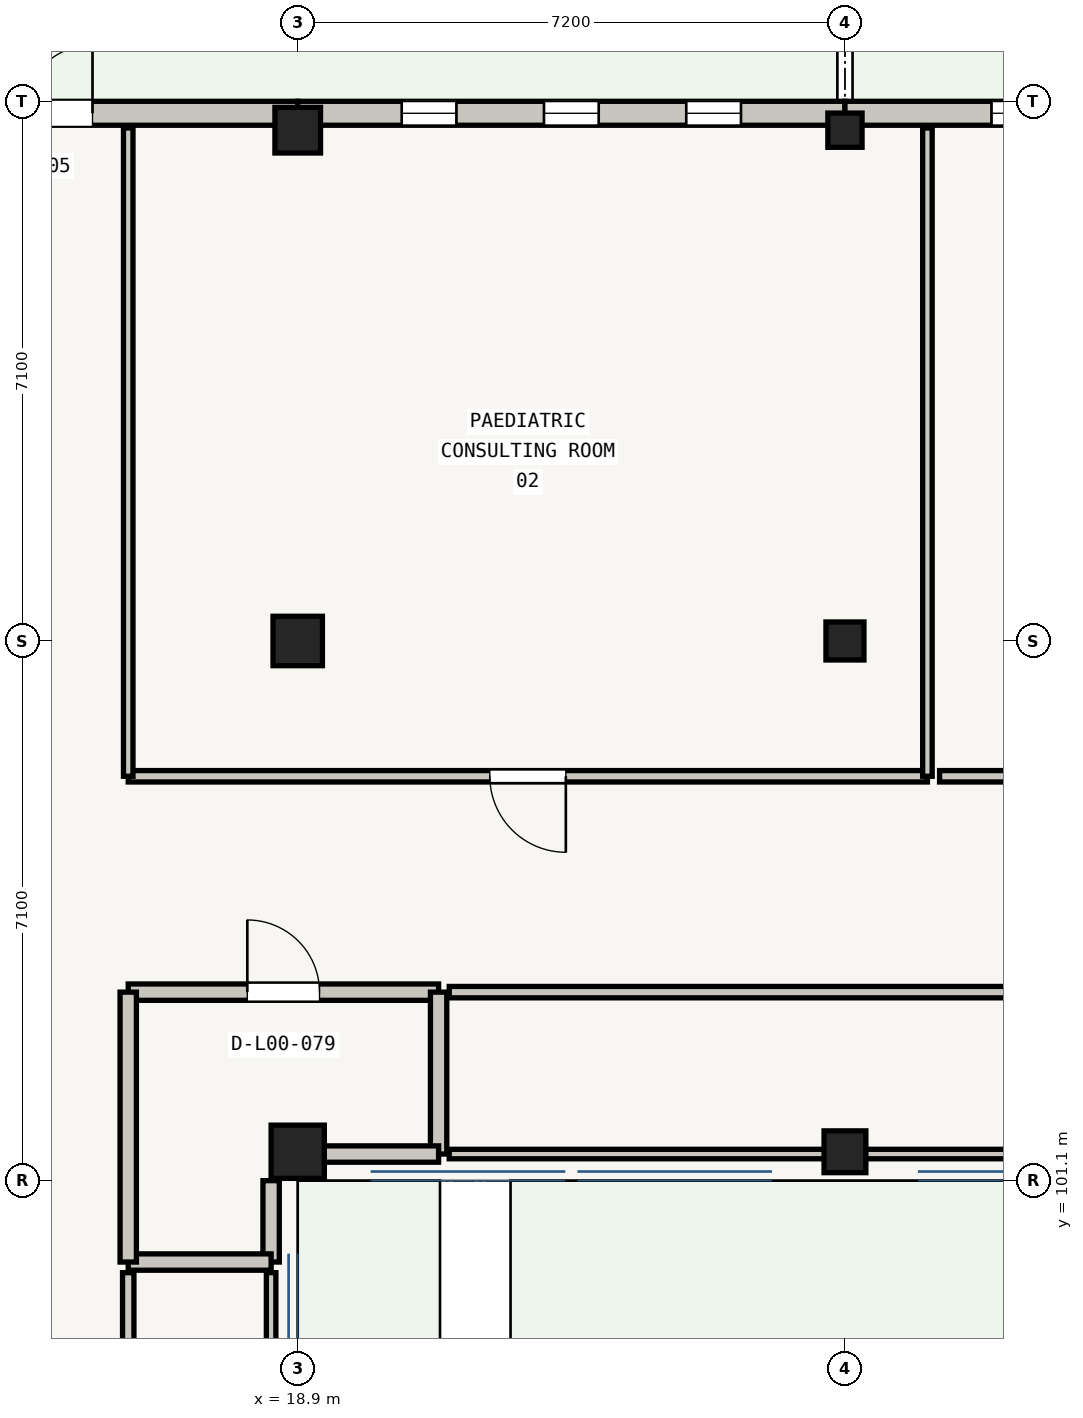
"""IFC4 building model, lengths in metres.
Left out: names, types, materials, properties, quantities, classifications, styles, units other than length and angle.
Written with IfcOpenShell. Run it as: python <this file> out.ifc"""

import sys

from ifc_helpers import new_model, si_unit, direction, frame, frame_2d, origin, origin_2d, place, context, subcontext, project, spatial, rectangle, extrude, element, fill, save


model = new_model("IFC4")
c1 = context("Model", 3, precision=1e-05, world=origin(), true_north=direction((0.0, 1.0)))
c2 = subcontext(c1, "Body", "Model", "MODEL_VIEW")
j1 = project(units=[si_unit("LENGTHUNIT", "METRE"), si_unit("PLANEANGLEUNIT", "RADIAN")], contexts=[c1])
p1 = place(None, origin())
s1 = spatial("IfcSite", under=j1, at=p1, CompositionType="ELEMENT")
p2 = place(p1, origin())
s2 = spatial("IfcBuilding", under=s1, at=p2, CompositionType="ELEMENT")
p3 = place(p2, origin())
s3 = spatial("IfcBuildingStorey", under=s2, at=p3, CompositionType="ELEMENT", Elevation=0.0)
p4 = place(p3, frame((18.9, 101.48, 0.0), z_axis=(0.0, 0.0, 1.0), x_axis=(1.0, 0.0, 0.0)))
e1 = element("IfcColumn", 1, at=p4, inside=s3, PredefinedType="COLUMN", context=c2, shape_type="SweptSolid", body=[
    extrude(rectangle(XDim=0.7, YDim=0.7, at=origin_2d()), origin(), (0.0, 0.0, 1.0), 4.235),
])
p5 = place(p3, frame((18.9, 108.2, 0.0), z_axis=(0.0, 0.0, 1.0), x_axis=(1.0, 0.0, 0.0)))
e2 = element("IfcColumn", 2, at=p5, inside=s3, PredefinedType="COLUMN", context=c2, shape_type="SweptSolid", body=[
    extrude(rectangle(XDim=0.65, YDim=0.65, at=origin_2d()), origin(), (0.0, 0.0, 1.0), 4.235),
])
p6 = place(p3, frame((18.9, 114.92, 0.0), z_axis=(0.0, 0.0, 1.0), x_axis=(1.0, 0.0, 0.0)))
e3 = element("IfcColumn", 3, at=p6, inside=s3, PredefinedType="COLUMN", context=c2, shape_type="SweptSolid", body=[
    extrude(rectangle(XDim=0.6, YDim=0.6, at=origin_2d()), origin(), (0.0, 0.0, 1.0), 4.235),
])
p7 = place(p3, frame((26.1, 101.48, 0.0), z_axis=(0.0, 0.0, 1.0), x_axis=(1.0, 0.0, 0.0)))
e4 = element("IfcColumn", 4, at=p7, inside=s3, PredefinedType="COLUMN", context=c2, shape_type="SweptSolid", body=[
    extrude(rectangle(XDim=0.55, YDim=0.55, at=origin_2d()), origin(), (0.0, 0.0, 1.0), 4.235),
])
p8 = place(p3, frame((26.1, 108.2, 0.0), z_axis=(0.0, 0.0, 1.0), x_axis=(1.0, 0.0, 0.0)))
e5 = element("IfcColumn", 5, at=p8, inside=s3, PredefinedType="COLUMN", context=c2, shape_type="SweptSolid", body=[
    extrude(rectangle(XDim=0.5, YDim=0.5, at=origin_2d()), origin(), (0.0, 0.0, 1.0), 4.235),
])
p9 = place(p3, frame((26.1, 114.92, 0.0), z_axis=(0.0, 0.0, 1.0), x_axis=(1.0, 0.0, 0.0)))
e6 = element("IfcColumn", 6, at=p9, inside=s3, PredefinedType="COLUMN", context=c2, shape_type="SweptSolid", body=[
    extrude(rectangle(XDim=0.45, YDim=0.45, at=origin_2d()), origin(), (0.0, 0.0, 1.0), 4.235),
])
p10 = place(p3, frame((11.7, 115.143, 0.0), z_axis=(0.0, 0.0, 1.0), x_axis=(1.0, 0.0, 0.0)))
e7 = element("IfcWall", 7, at=p10, inside=s3, PredefinedType="SOLIDWALL", context=c2, shape_type="SweptSolid", body=[
    extrude(rectangle(XDim=7.2, YDim=0.315, at=frame_2d((3.6, 0.0))), origin(), (0.0, 0.0, 1.0), 3.6),
])
p11 = place(p10, frame((2.7, 0.0, 0.0)))
e8 = element("IfcOpeningElement", 8, at=p11, cuts=e7, PredefinedType="OPENING", context=c2, shape_type="SweptSolid", body=[
    extrude(rectangle(XDim=1.8, YDim=2.1, at=frame_2d((0.9, 1.05))), frame((0.0, 0.157, 0.0), z_axis=(0.0, -1.0, 0.0), x_axis=(1.0, 0.0, 0.0)), (0.0, 0.0, 1.0), 0.315),
])
p12 = place(p3, frame((18.9, 115.143, 0.0), z_axis=(0.0, 0.0, 1.0), x_axis=(1.0, 0.0, 0.0)))
e9 = element("IfcWall", 9, at=p12, inside=s3, PredefinedType="SOLIDWALL", context=c2, shape_type="SweptSolid", body=[
    extrude(rectangle(XDim=7.2, YDim=0.315, at=frame_2d((3.6, 0.0))), origin(), (0.0, 0.0, 1.0), 3.27),
])
p13 = place(p12, frame((1.368, 0.0, 0.55)))
e10 = element("IfcOpeningElement", 10, at=p13, cuts=e9, PredefinedType="OPENING", context=c2, shape_type="SweptSolid", body=[
    extrude(rectangle(XDim=0.72, YDim=1.85, at=frame_2d((0.36, 0.925))), frame((0.0, 0.157, 0.0), z_axis=(0.0, -1.0, 0.0), x_axis=(1.0, 0.0, 0.0)), (0.0, 0.0, 1.0), 0.315),
])
p14 = place(p12, frame((3.24, 0.0, 0.55)))
e11 = element("IfcOpeningElement", 11, at=p14, cuts=e9, PredefinedType="OPENING", context=c2, shape_type="SweptSolid", body=[
    extrude(rectangle(XDim=0.72, YDim=1.85, at=frame_2d((0.36, 0.925))), frame((0.0, 0.157, 0.0), z_axis=(0.0, -1.0, 0.0), x_axis=(1.0, 0.0, 0.0)), (0.0, 0.0, 1.0), 0.315),
])
p15 = place(p12, frame((5.112, 0.0, 0.55)))
e12 = element("IfcOpeningElement", 12, at=p15, cuts=e9, PredefinedType="OPENING", context=c2, shape_type="SweptSolid", body=[
    extrude(rectangle(XDim=0.72, YDim=1.85, at=frame_2d((0.36, 0.925))), frame((0.0, 0.157, 0.0), z_axis=(0.0, -1.0, 0.0), x_axis=(1.0, 0.0, 0.0)), (0.0, 0.0, 1.0), 0.315),
])
p16 = place(p3, frame((26.1, 115.143, 0.0), z_axis=(0.0, 0.0, 1.0), x_axis=(1.0, 0.0, 0.0)))
e13 = element("IfcWall", 13, at=p16, inside=s3, PredefinedType="SOLIDWALL", context=c2, shape_type="SweptSolid", body=[
    extrude(rectangle(XDim=7.2, YDim=0.315, at=frame_2d((3.6, 0.0))), origin(), (0.0, 0.0, 1.0), 3.27),
])
p17 = place(p16, frame((1.928, 0.0, 0.55)))
e14 = element("IfcOpeningElement", 14, at=p17, cuts=e13, PredefinedType="OPENING", context=c2, shape_type="SweptSolid", body=[
    extrude(rectangle(XDim=0.8, YDim=1.8, at=frame_2d((0.4, 0.9))), frame((0.0, 0.157, 0.0), z_axis=(0.0, -1.0, 0.0), x_axis=(1.0, 0.0, 0.0)), (0.0, 0.0, 1.0), 0.315),
])
p18 = place(p16, frame((3.2, 0.0, 0.55)))
e15 = element("IfcOpeningElement", 15, at=p18, cuts=e13, PredefinedType="OPENING", context=c2, shape_type="SweptSolid", body=[
    extrude(rectangle(XDim=0.8, YDim=1.8, at=frame_2d((0.4, 0.9))), frame((0.0, 0.157, 0.0), z_axis=(0.0, -1.0, 0.0), x_axis=(1.0, 0.0, 0.0)), (0.0, 0.0, 1.0), 0.315),
])
p19 = place(p16, frame((5.072, 0.0, 0.55)))
e16 = element("IfcOpeningElement", 16, at=p19, cuts=e13, PredefinedType="OPENING", context=c2, shape_type="SweptSolid", body=[
    extrude(rectangle(XDim=0.8, YDim=1.8, at=frame_2d((0.4, 0.9))), frame((0.0, 0.157, 0.0), z_axis=(0.0, -1.0, 0.0), x_axis=(1.0, 0.0, 0.0)), (0.0, 0.0, 1.0), 0.315),
])
p20 = place(p3, frame((16.67, 103.58, 0.0), z_axis=(0.0, 0.0, 1.0), x_axis=(1.0, 0.0, 0.0)))
e17 = element("IfcWall", 17, at=p20, inside=s3, PredefinedType="PLUMBINGWALL", context=c2, shape_type="SweptSolid", body=[
    extrude(rectangle(XDim=4.083, YDim=0.215, at=frame_2d((2.042, 0.0))), origin(), (0.0, 0.0, 1.0), 3.255),
])
p21 = place(p20, frame((1.567, 0.0, 0.0)))
e18 = element("IfcOpeningElement", 18, at=p21, cuts=e17, PredefinedType="OPENING", context=c2, shape_type="SweptSolid", body=[
    extrude(rectangle(XDim=0.95, YDim=2.05, at=frame_2d((0.475, 1.025))), frame((0.0, 0.107, 0.0), z_axis=(0.0, -1.0, 0.0), x_axis=(1.0, 0.0, 0.0)), (0.0, 0.0, 1.0), 0.215),
])
p22 = place(p3, frame((18.55, 101.1, 0.0), z_axis=(0.0, 0.0, 1.0), x_axis=(0.0, -1.0, 0.0)))
e19 = element("IfcWall", 19, at=p22, inside=s3, PredefinedType="PLUMBINGWALL", context=c2, shape_type="SweptSolid", body=[
    extrude(rectangle(XDim=1.071, YDim=0.215, at=frame_2d((0.536, 0.0))), origin(), (0.0, 0.0, 1.0), 3.255),
])
p23 = place(p3, frame((18.55, 100.029, 0.0), z_axis=(0.0, 0.0, 1.0), x_axis=(-1.0, 0.0, 0.0)))
e20 = element("IfcWall", 20, at=p23, inside=s3, PredefinedType="PLUMBINGWALL", context=c2, shape_type="SweptSolid", body=[
    extrude(rectangle(XDim=1.88, YDim=0.215, at=frame_2d((0.94, 0.0))), origin(), (0.0, 0.0, 1.0), 3.255),
])
p24 = place(p3, frame((16.67, 100.029, 0.0), z_axis=(0.0, 0.0, 1.0), x_axis=(0.0, 1.0, 0.0)))
e21 = element("IfcWall", 21, at=p24, inside=s3, PredefinedType="PLUMBINGWALL", context=c2, shape_type="SweptSolid", body=[
    extrude(rectangle(XDim=3.551, YDim=0.215, at=frame_2d((1.775, 0.0))), origin(), (0.0, 0.0, 1.0), 3.255),
])
p25 = place(p3, frame((20.753, 103.58, 0.0), z_axis=(0.0, 0.0, 1.0), x_axis=(0.0, -1.0, 0.0)))
e22 = element("IfcWall", 22, at=p25, inside=s3, PredefinedType="PLUMBINGWALL", context=c2, shape_type="SweptSolid", body=[
    extrude(rectangle(XDim=2.13, YDim=0.215, at=frame_2d((1.065, 0.0))), origin(), (0.0, 0.0, 1.0), 3.255),
])
p26 = place(p3, frame((20.753, 101.45, 0.0), z_axis=(0.0, 0.0, 1.0), x_axis=(-1.0, 0.0, 0.0)))
e23 = element("IfcWall", 23, at=p26, inside=s3, PredefinedType="PLUMBINGWALL", context=c2, shape_type="SweptSolid", body=[
    extrude(rectangle(XDim=1.854, YDim=0.215, at=frame_2d((0.927, 0.0))), origin(), (0.0, 0.0, 1.0), 3.255),
])
p27 = place(p3, frame((27.185, 106.42, 0.0), z_axis=(0.0, 0.0, 1.0), x_axis=(-1.0, 0.0, 0.0)))
e24 = element("IfcWall", 24, at=p27, inside=s3, PredefinedType="PARTITIONING", context=c2, shape_type="SweptSolid", body=[
    extrude(rectangle(XDim=10.515, YDim=0.15, at=frame_2d((5.258, 0.0))), origin(), (0.0, 0.0, 1.0), 3.255),
])
p28 = place(p27, frame((4.758, 0.0, 0.0)))
e25 = element("IfcOpeningElement", 25, at=p28, cuts=e24, PredefinedType="OPENING", context=c2, shape_type="SweptSolid", body=[
    extrude(rectangle(XDim=1.0, YDim=2.05, at=frame_2d((0.5, 1.025))), frame((0.0, 0.075, 0.0), z_axis=(0.0, -1.0, 0.0), x_axis=(1.0, 0.0, 0.0)), (0.0, 0.0, 1.0), 0.15),
])
for number, where, z_axis, x_axis in (
    (26, (27.185, 114.95, 0.0), (0.0, 0.0, 1.0), (0.0, -1.0, 0.0)),
    (27, (16.67, 106.42, 0.0), (0.0, 0.0, 1.0), (0.0, 1.0, 0.0)),
):
    element("IfcWall", number, at=place(p3, frame(where, z_axis=z_axis, x_axis=x_axis)), inside=s3, PredefinedType="PARTITIONING", context=c2, shape_type="SweptSolid", body=[
        extrude(rectangle(XDim=8.53, YDim=0.125, at=frame_2d((4.265, 0.0))), origin(), (0.0, 0.0, 1.0), 3.255),
    ])
p29 = place(p3, frame((37.86, 106.42, 0.0), z_axis=(0.0, 0.0, 1.0), x_axis=(-1.0, 0.0, 0.0)))
e28 = element("IfcWall", 28, at=p29, inside=s3, PredefinedType="PARTITIONING", context=c2, shape_type="SweptSolid", body=[
    extrude(rectangle(XDim=10.515, YDim=0.15, at=frame_2d((5.258, 0.0))), origin(), (0.0, 0.0, 1.0), 3.255),
])
p30 = place(p29, frame((4.758, 0.0, 0.0)))
e29 = element("IfcOpeningElement", 29, at=p30, cuts=e28, PredefinedType="OPENING", context=c2, shape_type="SweptSolid", body=[
    extrude(rectangle(XDim=1.0, YDim=2.05, at=frame_2d((0.5, 1.025))), frame((0.0, 0.075, 0.0), z_axis=(0.0, -1.0, 0.0), x_axis=(1.0, 0.0, 0.0)), (0.0, 0.0, 1.0), 0.15),
])
p31 = place(p3, frame((20.894, 103.58, 0.0), z_axis=(0.0, 0.0, 1.0), x_axis=(1.0, 0.0, 0.0)))
e30 = element("IfcWall", 30, at=p31, inside=s3, PredefinedType="PARTITIONING", context=c2, shape_type="SweptSolid", body=[
    extrude(rectangle(XDim=26.457, YDim=0.15, at=frame_2d((13.228, 0.0))), origin(), (0.0, 0.0, 1.0), 3.255),
])
p32 = place(p31, frame((12.708, 0.0, 0.0)))
e31 = element("IfcOpeningElement", 31, at=p32, cuts=e30, PredefinedType="OPENING", context=c2, shape_type="SweptSolid", body=[
    extrude(rectangle(XDim=1.04, YDim=2.05, at=frame_2d((0.52, 1.025))), frame((0.0, 0.075, 0.0), z_axis=(0.0, -1.0, 0.0), x_axis=(1.0, 0.0, 0.0)), (0.0, 0.0, 1.0), 0.15),
])
p33 = place(p3, frame((47.35, 101.45, 0.0), z_axis=(0.0, 0.0, 1.0), x_axis=(-1.0, 0.0, 0.0)))
e32 = element("IfcWall", 32, at=p33, inside=s3, PredefinedType="PARTITIONING", context=c2, shape_type="SweptSolid", body=[
    extrude(rectangle(XDim=26.457, YDim=0.125, at=frame_2d((13.228, 0.0))), origin(), (0.0, 0.0, 1.0), 3.255),
])
p34 = place(p3, frame((16.67, 77.03, 0.0), z_axis=(0.0, 0.0, 1.0), x_axis=(0.0, 1.0, 0.0)))
e33 = element("IfcWall", 33, at=p34, inside=s3, PredefinedType="PARTITIONING", context=c2, shape_type="SweptSolid", body=[
    extrude(rectangle(XDim=22.859, YDim=0.15, at=frame_2d((11.43, 0.0))), origin(), (0.0, 0.0, 1.0), 3.255),
])
p35 = place(p34, frame((10.929, 0.0, 0.0)))
e34 = element("IfcOpeningElement", 34, at=p35, cuts=e33, PredefinedType="OPENING", context=c2, shape_type="SweptSolid", body=[
    extrude(rectangle(XDim=1.0, YDim=2.05, at=frame_2d((0.5, 1.025))), frame((0.0, 0.075, 0.0), z_axis=(0.0, -1.0, 0.0), x_axis=(1.0, 0.0, 0.0)), (0.0, 0.0, 1.0), 0.15),
])
p36 = place(p3, frame((18.55, 99.889, 0.0), z_axis=(0.0, 0.0, 1.0), x_axis=(0.0, -1.0, 0.0)))
e35 = element("IfcWall", 35, at=p36, inside=s3, PredefinedType="PARTITIONING", context=c2, shape_type="SweptSolid", body=[
    extrude(rectangle(XDim=22.859, YDim=0.125, at=frame_2d((11.43, 0.0))), origin(), (0.0, 0.0, 1.0), 3.255),
])
p37 = place(p11, origin())
e36 = element("IfcDoor", 36, at=p37, inside=s3, OperationType="DOUBLE_DOOR_SINGLE_SWING", PredefinedType="DOOR", context=c2, shape_type="SweptSolid", body=[
    extrude(rectangle(XDim=1.8, YDim=2.1, at=frame_2d((0.9, 1.05))), frame((0.0, 0.025, 0.0), z_axis=(0.0, -1.0, 0.0), x_axis=(1.0, 0.0, 0.0)), (0.0, 0.0, 1.0), 0.05),
])
fill(e8, e36)
p38 = place(p13, origin())
e37 = element("IfcWindow", 37, at=p38, inside=s3, PartitioningType="SINGLE_PANEL", PredefinedType="WINDOW", context=c2, shape_type="SweptSolid", body=[
    extrude(rectangle(XDim=0.72, YDim=1.85, at=frame_2d((0.36, 0.925))), frame((0.0, 0.03, 0.0), z_axis=(0.0, -1.0, 0.0), x_axis=(1.0, 0.0, 0.0)), (0.0, 0.0, 1.0), 0.06),
])
fill(e10, e37)
p39 = place(p14, origin())
e38 = element("IfcWindow", 38, at=p39, inside=s3, PartitioningType="SINGLE_PANEL", PredefinedType="WINDOW", context=c2, shape_type="SweptSolid", body=[
    extrude(rectangle(XDim=0.72, YDim=1.85, at=frame_2d((0.36, 0.925))), frame((0.0, 0.03, 0.0), z_axis=(0.0, -1.0, 0.0), x_axis=(1.0, 0.0, 0.0)), (0.0, 0.0, 1.0), 0.06),
])
fill(e11, e38)
p40 = place(p15, origin())
e39 = element("IfcWindow", 39, at=p40, inside=s3, PartitioningType="SINGLE_PANEL", PredefinedType="WINDOW", context=c2, shape_type="SweptSolid", body=[
    extrude(rectangle(XDim=0.72, YDim=1.85, at=frame_2d((0.36, 0.925))), frame((0.0, 0.03, 0.0), z_axis=(0.0, -1.0, 0.0), x_axis=(1.0, 0.0, 0.0)), (0.0, 0.0, 1.0), 0.06),
])
fill(e12, e39)
p41 = place(p17, origin())
e40 = element("IfcWindow", 40, at=p41, inside=s3, PartitioningType="SINGLE_PANEL", PredefinedType="WINDOW", context=c2, shape_type="SweptSolid", body=[
    extrude(rectangle(XDim=0.8, YDim=1.8, at=frame_2d((0.4, 0.9))), frame((0.0, 0.03, 0.0), z_axis=(0.0, -1.0, 0.0), x_axis=(1.0, 0.0, 0.0)), (0.0, 0.0, 1.0), 0.06),
])
fill(e14, e40)
p42 = place(p21, origin())
e41 = element("IfcDoor", 41, at=p42, inside=s3, OperationType="SINGLE_SWING_LEFT", PredefinedType="DOOR", context=c2, shape_type="SweptSolid", body=[
    extrude(rectangle(XDim=0.95, YDim=2.05, at=frame_2d((0.475, 1.025))), frame((0.0, 0.025, 0.0), z_axis=(0.0, -1.0, 0.0), x_axis=(1.0, 0.0, 0.0)), (0.0, 0.0, 1.0), 0.05),
])
fill(e18, e41)
p43 = place(p28, origin())
e42 = element("IfcDoor", 42, at=p43, inside=s3, OperationType="SINGLE_SWING_LEFT", PredefinedType="DOOR", context=c2, shape_type="SweptSolid", body=[
    extrude(rectangle(XDim=1.0, YDim=2.05, at=frame_2d((0.5, 1.025))), frame((0.0, 0.025, 0.0), z_axis=(0.0, -1.0, 0.0), x_axis=(1.0, 0.0, 0.0)), (0.0, 0.0, 1.0), 0.05),
])
fill(e25, e42)
save(model, sys.argv[1])
